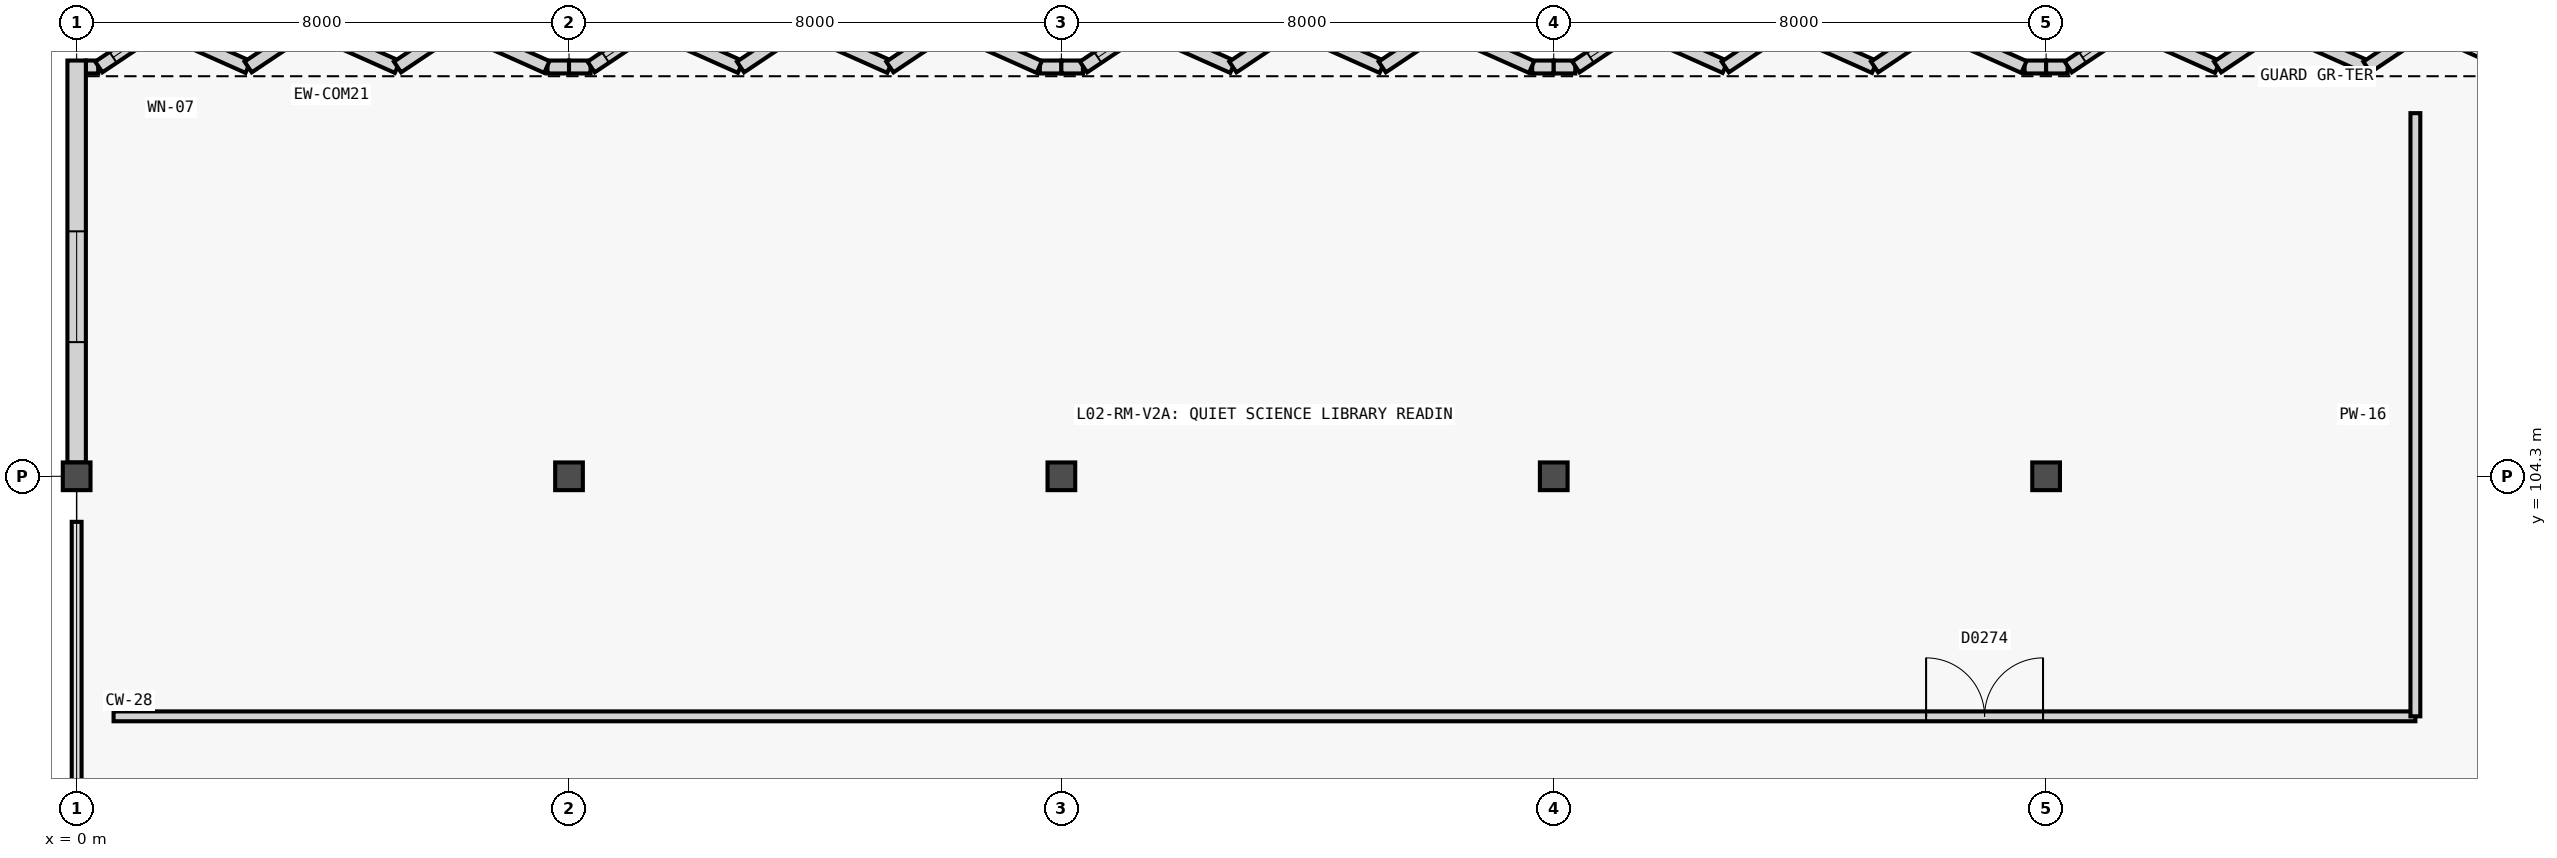
"""IFC4 building model, lengths in metres.
Left out: names, types, materials, properties, quantities, classifications, styles, units other than length and angle.
Written with IfcOpenShell. Run it as: python <this file> out.ifc"""

import sys

from ifc_helpers import new_model, si_unit, direction, frame, frame_2d, origin, origin_2d, place, context, subcontext, project, spatial, rectangle, extrude, element, fill, save


model = new_model("IFC4")
c1 = context("Model", 3, precision=1e-05, world=origin(), true_north=direction((0.0, 1.0)))
c2 = subcontext(c1, "Body", "Model", "MODEL_VIEW")
j1 = project(units=[si_unit("LENGTHUNIT", "METRE"), si_unit("PLANEANGLEUNIT", "RADIAN")], contexts=[c1])
p1 = place(None, origin())
s1 = spatial("IfcSite", under=j1, at=p1, CompositionType="ELEMENT")
p2 = place(p1, origin())
s2 = spatial("IfcBuilding", under=s1, at=p2, CompositionType="ELEMENT")
p3 = place(p2, frame((0.0, 0.0, 10.2)))
s3 = spatial("IfcBuildingStorey", under=s2, at=p3, CompositionType="ELEMENT", Elevation=10.2)
for number, where, z_axis, x_axis in (
    (1, (0.0, 104.3, 0.0), (0.0, 0.0, 1.0), (1.0, 0.0, 0.0)),
    (2, (8.0, 104.3, 0.0), (0.0, 0.0, 1.0), (1.0, 0.0, 0.0)),
    (3, (16.0, 104.3, 0.0), (0.0, 0.0, 1.0), (1.0, 0.0, 0.0)),
    (4, (24.0, 104.3, 0.0), (0.0, 0.0, 1.0), (1.0, 0.0, 0.0)),
    (5, (32.0, 104.3, 0.0), (0.0, 0.0, 1.0), (1.0, 0.0, 0.0)),
):
    element("IfcColumn", number, at=place(p3, frame(where, z_axis=z_axis, x_axis=x_axis)), inside=s3, PredefinedType="COLUMN", context=c2, shape_type="SweptSolid", body=[
        extrude(rectangle(XDim=0.45, YDim=0.45, at=origin_2d()), origin(), (0.0, 0.0, 1.0), 4.2),
    ])
p4 = place(p3, frame((0.145, 110.95, 0.0), z_axis=(0.0, 0.0, 1.0), x_axis=(1.0, 0.0, 0.0)))
e6 = element("IfcWall", 6, at=p4, inside=s3, PredefinedType="SOLIDWALL", context=c2, shape_type="SweptSolid", body=[
    extrude(rectangle(XDim=0.205, YDim=0.21, at=frame_2d((0.103, 0.0))), origin(), (0.0, 0.0, 1.0), 3.92),
])
for number, where, z_axis, x_axis in (
    (7, (7.65, 110.95, 0.0), (0.0, 0.0, 1.0), (1.0, 0.0, 0.0)),
    (8, (8.0, 110.95, 0.0), (0.0, 0.0, 1.0), (1.0, 0.0, 0.0)),
    (9, (15.65, 110.95, 0.0), (0.0, 0.0, 1.0), (1.0, 0.0, 0.0)),
    (10, (16.0, 110.95, 0.0), (0.0, 0.0, 1.0), (1.0, 0.0, 0.0)),
    (11, (23.65, 110.95, 0.0), (0.0, 0.0, 1.0), (1.0, 0.0, 0.0)),
    (12, (24.0, 110.95, 0.0), (0.0, 0.0, 1.0), (1.0, 0.0, 0.0)),
    (13, (31.65, 110.95, 0.0), (0.0, 0.0, 1.0), (1.0, 0.0, 0.0)),
    (14, (32.0, 110.95, 0.0), (0.0, 0.0, 1.0), (1.0, 0.0, 0.0)),
):
    element("IfcWall", number, at=place(p3, frame(where, z_axis=z_axis, x_axis=x_axis)), inside=s3, PredefinedType="SOLIDWALL", context=c2, shape_type="SweptSolid", body=[
        extrude(rectangle(XDim=0.35, YDim=0.21, at=frame_2d((0.175, 0.0))), origin(), (0.0, 0.0, 1.0), 3.92),
    ])
p5 = place(p3, frame((0.36, 110.95, 0.0), z_axis=(0.0, 0.0, 1.0), x_axis=(0.830858868059, 0.556483190553, 0.0)))
e15 = element("IfcWall", 15, at=p5, inside=s3, PredefinedType="SOLIDWALL", context=c2, shape_type="SweptSolid", body=[
    extrude(rectangle(XDim=1.168, YDim=0.21, at=frame_2d((0.584, 0.0))), origin(), (0.0, 0.0, 1.0), 3.92),
])
p6 = place(p5, frame((0.28, 0.0, 0.85)))
e16 = element("IfcOpeningElement", 16, at=p6, cuts=e15, PredefinedType="OPENING", context=c2, shape_type="SweptSolid", body=[
    extrude(rectangle(XDim=0.65, YDim=1.7, at=frame_2d((0.325, 0.85))), frame((0.0, 0.115, 0.0), z_axis=(0.0, -1.0, 0.0), x_axis=(1.0, 0.0, 0.0)), (0.0, 0.0, 1.0), 0.23),
])
p7 = place(p3, frame((1.331, 111.6, 0.0), z_axis=(0.0, 0.0, 1.0), x_axis=(0.913083928543, -0.407771675618, 0.0)))
e17 = element("IfcWall", 17, at=p7, inside=s3, PredefinedType="SOLIDWALL", context=c2, shape_type="SweptSolid", body=[
    extrude(rectangle(XDim=1.594, YDim=0.21, at=frame_2d((0.797, 0.0))), origin(), (0.0, 0.0, 1.0), 3.92),
])
p8 = place(p3, frame((2.787, 110.95, 0.0), z_axis=(0.0, 0.0, 1.0), x_axis=(0.830858868059, 0.556483190553, 0.0)))
e18 = element("IfcWall", 18, at=p8, inside=s3, PredefinedType="SOLIDWALL", context=c2, shape_type="SweptSolid", body=[
    extrude(rectangle(XDim=1.168, YDim=0.21, at=frame_2d((0.584, 0.0))), origin(), (0.0, 0.0, 1.0), 3.92),
])
p9 = place(p3, frame((3.757, 111.6, 0.0), z_axis=(0.0, 0.0, 1.0), x_axis=(0.913109384471, -0.407714669826, 0.0)))
e19 = element("IfcWall", 19, at=p9, inside=s3, PredefinedType="SOLIDWALL", context=c2, shape_type="SweptSolid", body=[
    extrude(rectangle(XDim=1.595, YDim=0.21, at=frame_2d((0.797, 0.0))), origin(), (0.0, 0.0, 1.0), 3.92),
])
p10 = place(p3, frame((5.213, 110.95, 0.0), z_axis=(0.0, 0.0, 1.0), x_axis=(0.830858868059, 0.556483190553, 0.0)))
e20 = element("IfcWall", 20, at=p10, inside=s3, PredefinedType="SOLIDWALL", context=c2, shape_type="SweptSolid", body=[
    extrude(rectangle(XDim=1.168, YDim=0.21, at=frame_2d((0.584, 0.0))), origin(), (0.0, 0.0, 1.0), 3.92),
])
p11 = place(p3, frame((6.184, 111.6, 0.0), z_axis=(0.0, 0.0, 1.0), x_axis=(0.913083928543, -0.407771675618, 0.0)))
e21 = element("IfcWall", 21, at=p11, inside=s3, PredefinedType="SOLIDWALL", context=c2, shape_type="SweptSolid", body=[
    extrude(rectangle(XDim=1.594, YDim=0.21, at=frame_2d((0.797, 0.0))), origin(), (0.0, 0.0, 1.0), 3.92),
])
p12 = place(p3, frame((8.36, 110.95, 0.0), z_axis=(0.0, 0.0, 1.0), x_axis=(0.830858868059, 0.556483190553, 0.0)))
e22 = element("IfcWall", 22, at=p12, inside=s3, PredefinedType="SOLIDWALL", context=c2, shape_type="SweptSolid", body=[
    extrude(rectangle(XDim=1.168, YDim=0.21, at=frame_2d((0.584, 0.0))), origin(), (0.0, 0.0, 1.0), 3.92),
])
p13 = place(p12, frame((0.28, 0.0, 0.85)))
e23 = element("IfcOpeningElement", 23, at=p13, cuts=e22, PredefinedType="OPENING", context=c2, shape_type="SweptSolid", body=[
    extrude(rectangle(XDim=0.65, YDim=1.7, at=frame_2d((0.325, 0.85))), frame((0.0, 0.115, 0.0), z_axis=(0.0, -1.0, 0.0), x_axis=(1.0, 0.0, 0.0)), (0.0, 0.0, 1.0), 0.23),
])
p14 = place(p3, frame((9.331, 111.6, 0.0), z_axis=(0.0, 0.0, 1.0), x_axis=(0.913083928543, -0.407771675618, 0.0)))
e24 = element("IfcWall", 24, at=p14, inside=s3, PredefinedType="SOLIDWALL", context=c2, shape_type="SweptSolid", body=[
    extrude(rectangle(XDim=1.594, YDim=0.21, at=frame_2d((0.797, 0.0))), origin(), (0.0, 0.0, 1.0), 3.92),
])
p15 = place(p3, frame((10.787, 110.95, 0.0), z_axis=(0.0, 0.0, 1.0), x_axis=(0.830858868059, 0.556483190553, 0.0)))
e25 = element("IfcWall", 25, at=p15, inside=s3, PredefinedType="SOLIDWALL", context=c2, shape_type="SweptSolid", body=[
    extrude(rectangle(XDim=1.168, YDim=0.21, at=frame_2d((0.584, 0.0))), origin(), (0.0, 0.0, 1.0), 3.92),
])
p16 = place(p3, frame((11.757, 111.6, 0.0), z_axis=(0.0, 0.0, 1.0), x_axis=(0.913109384471, -0.407714669826, 0.0)))
e26 = element("IfcWall", 26, at=p16, inside=s3, PredefinedType="SOLIDWALL", context=c2, shape_type="SweptSolid", body=[
    extrude(rectangle(XDim=1.595, YDim=0.21, at=frame_2d((0.797, 0.0))), origin(), (0.0, 0.0, 1.0), 3.92),
])
p17 = place(p3, frame((13.213, 110.95, 0.0), z_axis=(0.0, 0.0, 1.0), x_axis=(0.830858868059, 0.556483190553, 0.0)))
e27 = element("IfcWall", 27, at=p17, inside=s3, PredefinedType="SOLIDWALL", context=c2, shape_type="SweptSolid", body=[
    extrude(rectangle(XDim=1.168, YDim=0.21, at=frame_2d((0.584, 0.0))), origin(), (0.0, 0.0, 1.0), 3.92),
])
p18 = place(p3, frame((14.184, 111.6, 0.0), z_axis=(0.0, 0.0, 1.0), x_axis=(0.913083928543, -0.407771675618, 0.0)))
e28 = element("IfcWall", 28, at=p18, inside=s3, PredefinedType="SOLIDWALL", context=c2, shape_type="SweptSolid", body=[
    extrude(rectangle(XDim=1.594, YDim=0.21, at=frame_2d((0.797, 0.0))), origin(), (0.0, 0.0, 1.0), 3.92),
])
p19 = place(p3, frame((16.36, 110.95, 0.0), z_axis=(0.0, 0.0, 1.0), x_axis=(0.830858868059, 0.556483190553, 0.0)))
e29 = element("IfcWall", 29, at=p19, inside=s3, PredefinedType="SOLIDWALL", context=c2, shape_type="SweptSolid", body=[
    extrude(rectangle(XDim=1.168, YDim=0.21, at=frame_2d((0.584, 0.0))), origin(), (0.0, 0.0, 1.0), 3.92),
])
p20 = place(p19, frame((0.28, 0.0, 0.85)))
e30 = element("IfcOpeningElement", 30, at=p20, cuts=e29, PredefinedType="OPENING", context=c2, shape_type="SweptSolid", body=[
    extrude(rectangle(XDim=0.65, YDim=1.7, at=frame_2d((0.325, 0.85))), frame((0.0, 0.115, 0.0), z_axis=(0.0, -1.0, 0.0), x_axis=(1.0, 0.0, 0.0)), (0.0, 0.0, 1.0), 0.23),
])
p21 = place(p3, frame((17.331, 111.6, 0.0), z_axis=(0.0, 0.0, 1.0), x_axis=(0.913083928543, -0.407771675618, 0.0)))
e31 = element("IfcWall", 31, at=p21, inside=s3, PredefinedType="SOLIDWALL", context=c2, shape_type="SweptSolid", body=[
    extrude(rectangle(XDim=1.594, YDim=0.21, at=frame_2d((0.797, 0.0))), origin(), (0.0, 0.0, 1.0), 3.92),
])
p22 = place(p3, frame((18.787, 110.95, 0.0), z_axis=(0.0, 0.0, 1.0), x_axis=(0.830858868059, 0.556483190553, 0.0)))
e32 = element("IfcWall", 32, at=p22, inside=s3, PredefinedType="SOLIDWALL", context=c2, shape_type="SweptSolid", body=[
    extrude(rectangle(XDim=1.168, YDim=0.21, at=frame_2d((0.584, 0.0))), origin(), (0.0, 0.0, 1.0), 3.92),
])
p23 = place(p3, frame((19.757, 111.6, 0.0), z_axis=(0.0, 0.0, 1.0), x_axis=(0.913109384471, -0.407714669826, 0.0)))
e33 = element("IfcWall", 33, at=p23, inside=s3, PredefinedType="SOLIDWALL", context=c2, shape_type="SweptSolid", body=[
    extrude(rectangle(XDim=1.595, YDim=0.21, at=frame_2d((0.797, 0.0))), origin(), (0.0, 0.0, 1.0), 3.92),
])
p24 = place(p3, frame((21.213, 110.95, 0.0), z_axis=(0.0, 0.0, 1.0), x_axis=(0.830858868059, 0.556483190553, 0.0)))
e34 = element("IfcWall", 34, at=p24, inside=s3, PredefinedType="SOLIDWALL", context=c2, shape_type="SweptSolid", body=[
    extrude(rectangle(XDim=1.168, YDim=0.21, at=frame_2d((0.584, 0.0))), origin(), (0.0, 0.0, 1.0), 3.92),
])
p25 = place(p3, frame((22.184, 111.6, 0.0), z_axis=(0.0, 0.0, 1.0), x_axis=(0.913083928543, -0.407771675618, 0.0)))
e35 = element("IfcWall", 35, at=p25, inside=s3, PredefinedType="SOLIDWALL", context=c2, shape_type="SweptSolid", body=[
    extrude(rectangle(XDim=1.594, YDim=0.21, at=frame_2d((0.797, 0.0))), origin(), (0.0, 0.0, 1.0), 3.92),
])
p26 = place(p3, frame((24.36, 110.95, 0.0), z_axis=(0.0, 0.0, 1.0), x_axis=(0.830858868059, 0.556483190553, 0.0)))
e36 = element("IfcWall", 36, at=p26, inside=s3, PredefinedType="SOLIDWALL", context=c2, shape_type="SweptSolid", body=[
    extrude(rectangle(XDim=1.168, YDim=0.21, at=frame_2d((0.584, 0.0))), origin(), (0.0, 0.0, 1.0), 3.92),
])
p27 = place(p26, frame((0.28, 0.0, 0.85)))
e37 = element("IfcOpeningElement", 37, at=p27, cuts=e36, PredefinedType="OPENING", context=c2, shape_type="SweptSolid", body=[
    extrude(rectangle(XDim=0.65, YDim=1.7, at=frame_2d((0.325, 0.85))), frame((0.0, 0.115, 0.0), z_axis=(0.0, -1.0, 0.0), x_axis=(1.0, 0.0, 0.0)), (0.0, 0.0, 1.0), 0.23),
])
p28 = place(p3, frame((25.331, 111.6, 0.0), z_axis=(0.0, 0.0, 1.0), x_axis=(0.913083928543, -0.407771675618, 0.0)))
e38 = element("IfcWall", 38, at=p28, inside=s3, PredefinedType="SOLIDWALL", context=c2, shape_type="SweptSolid", body=[
    extrude(rectangle(XDim=1.594, YDim=0.21, at=frame_2d((0.797, 0.0))), origin(), (0.0, 0.0, 1.0), 3.92),
])
p29 = place(p3, frame((26.787, 110.95, 0.0), z_axis=(0.0, 0.0, 1.0), x_axis=(0.830858868059, 0.556483190553, 0.0)))
e39 = element("IfcWall", 39, at=p29, inside=s3, PredefinedType="SOLIDWALL", context=c2, shape_type="SweptSolid", body=[
    extrude(rectangle(XDim=1.168, YDim=0.21, at=frame_2d((0.584, 0.0))), origin(), (0.0, 0.0, 1.0), 3.92),
])
p30 = place(p3, frame((27.757, 111.6, 0.0), z_axis=(0.0, 0.0, 1.0), x_axis=(0.913109384471, -0.407714669826, 0.0)))
e40 = element("IfcWall", 40, at=p30, inside=s3, PredefinedType="SOLIDWALL", context=c2, shape_type="SweptSolid", body=[
    extrude(rectangle(XDim=1.595, YDim=0.21, at=frame_2d((0.797, 0.0))), origin(), (0.0, 0.0, 1.0), 3.92),
])
p31 = place(p3, frame((29.213, 110.95, 0.0), z_axis=(0.0, 0.0, 1.0), x_axis=(0.830858868059, 0.556483190553, 0.0)))
e41 = element("IfcWall", 41, at=p31, inside=s3, PredefinedType="SOLIDWALL", context=c2, shape_type="SweptSolid", body=[
    extrude(rectangle(XDim=1.168, YDim=0.21, at=frame_2d((0.584, 0.0))), origin(), (0.0, 0.0, 1.0), 3.92),
])
p32 = place(p3, frame((30.184, 111.6, 0.0), z_axis=(0.0, 0.0, 1.0), x_axis=(0.913083928543, -0.407771675618, 0.0)))
e42 = element("IfcWall", 42, at=p32, inside=s3, PredefinedType="SOLIDWALL", context=c2, shape_type="SweptSolid", body=[
    extrude(rectangle(XDim=1.594, YDim=0.21, at=frame_2d((0.797, 0.0))), origin(), (0.0, 0.0, 1.0), 3.92),
])
p33 = place(p3, frame((32.36, 110.95, 0.0), z_axis=(0.0, 0.0, 1.0), x_axis=(0.830858868059, 0.556483190553, 0.0)))
e43 = element("IfcWall", 43, at=p33, inside=s3, PredefinedType="SOLIDWALL", context=c2, shape_type="SweptSolid", body=[
    extrude(rectangle(XDim=1.168, YDim=0.21, at=frame_2d((0.584, 0.0))), origin(), (0.0, 0.0, 1.0), 3.92),
])
p34 = place(p33, frame((0.28, 0.0, 0.85)))
e44 = element("IfcOpeningElement", 44, at=p34, cuts=e43, PredefinedType="OPENING", context=c2, shape_type="SweptSolid", body=[
    extrude(rectangle(XDim=0.65, YDim=1.7, at=frame_2d((0.325, 0.85))), frame((0.0, 0.115, 0.0), z_axis=(0.0, -1.0, 0.0), x_axis=(1.0, 0.0, 0.0)), (0.0, 0.0, 1.0), 0.23),
])
p35 = place(p3, frame((33.331, 111.6, 0.0), z_axis=(0.0, 0.0, 1.0), x_axis=(0.913083928543, -0.407771675618, 0.0)))
e45 = element("IfcWall", 45, at=p35, inside=s3, PredefinedType="SOLIDWALL", context=c2, shape_type="SweptSolid", body=[
    extrude(rectangle(XDim=1.594, YDim=0.21, at=frame_2d((0.797, 0.0))), origin(), (0.0, 0.0, 1.0), 3.92),
])
p36 = place(p3, frame((34.787, 110.95, 0.0), z_axis=(0.0, 0.0, 1.0), x_axis=(0.830858868059, 0.556483190553, 0.0)))
e46 = element("IfcWall", 46, at=p36, inside=s3, PredefinedType="SOLIDWALL", context=c2, shape_type="SweptSolid", body=[
    extrude(rectangle(XDim=1.168, YDim=0.21, at=frame_2d((0.584, 0.0))), origin(), (0.0, 0.0, 1.0), 3.92),
])
p37 = place(p3, frame((35.757, 111.6, 0.0), z_axis=(0.0, 0.0, 1.0), x_axis=(0.913109384471, -0.407714669826, 0.0)))
e47 = element("IfcWall", 47, at=p37, inside=s3, PredefinedType="SOLIDWALL", context=c2, shape_type="SweptSolid", body=[
    extrude(rectangle(XDim=1.595, YDim=0.21, at=frame_2d((0.797, 0.0))), origin(), (0.0, 0.0, 1.0), 3.92),
])
p38 = place(p3, frame((37.213, 110.95, 0.0), z_axis=(0.0, 0.0, 1.0), x_axis=(0.830858868059, 0.556483190553, 0.0)))
e48 = element("IfcWall", 48, at=p38, inside=s3, PredefinedType="SOLIDWALL", context=c2, shape_type="SweptSolid", body=[
    extrude(rectangle(XDim=1.168, YDim=0.21, at=frame_2d((0.584, 0.0))), origin(), (0.0, 0.0, 1.0), 3.92),
])
p39 = place(p3, frame((38.184, 111.6, 0.0), z_axis=(0.0, 0.0, 1.0), x_axis=(0.913083928543, -0.407771675618, 0.0)))
e49 = element("IfcWall", 49, at=p39, inside=s3, PredefinedType="SOLIDWALL", context=c2, shape_type="SweptSolid", body=[
    extrude(rectangle(XDim=1.594, YDim=0.21, at=frame_2d((0.797, 0.0))), origin(), (0.0, 0.0, 1.0), 3.92),
])
p40 = place(p3, frame((0.0, 104.523, 0.0), z_axis=(0.0, 0.0, 1.0), x_axis=(0.0, 1.0, 0.0)))
e50 = element("IfcWall", 50, at=p40, inside=s3, PredefinedType="SOLIDWALL", context=c2, shape_type="SweptSolid", body=[
    extrude(rectangle(XDim=6.532, YDim=0.3, at=frame_2d((3.266, 0.0))), origin(), (0.0, 0.0, 1.0), 3.92),
])
p41 = place(p40, frame((1.957, 0.0, 0.9)))
e51 = element("IfcOpeningElement", 51, at=p41, cuts=e50, PredefinedType="OPENING", context=c2, shape_type="SweptSolid", body=[
    extrude(rectangle(XDim=1.8, YDim=1.55, at=frame_2d((0.9, 0.775))), frame((0.0, 0.16, 0.0), z_axis=(0.0, -1.0, 0.0), x_axis=(1.0, 0.0, 0.0)), (0.0, 0.0, 1.0), 0.32),
])
p42 = place(p3, frame((0.6, 100.4, 0.0), z_axis=(0.0, 0.0, 1.0), x_axis=(1.0, 0.0, 0.0)))
e52 = element("IfcWall", 52, at=p42, inside=s3, PredefinedType="PARTITIONING", context=c2, shape_type="SweptSolid", body=[
    extrude(rectangle(XDim=37.4, YDim=0.16, at=frame_2d((18.7, 0.0))), origin(), (0.0, 0.0, 1.0), 3.94),
])
p43 = place(p42, frame((29.45, 0.0, 0.0)))
e53 = element("IfcOpeningElement", 53, at=p43, cuts=e52, PredefinedType="OPENING", context=c2, shape_type="SweptSolid", body=[
    extrude(rectangle(XDim=1.9, YDim=2.3, at=frame_2d((0.95, 1.15))), frame((0.0, 0.09, 0.0), z_axis=(0.0, -1.0, 0.0), x_axis=(1.0, 0.0, 0.0)), (0.0, 0.0, 1.0), 0.18),
])
p44 = place(p3, frame((38.0, 100.4, 0.0), z_axis=(0.0, 0.0, 1.0), x_axis=(0.0, 1.0, 0.0)))
e54 = element("IfcWall", 54, at=p44, inside=s3, PredefinedType="PARTITIONING", context=c2, shape_type="SweptSolid", body=[
    extrude(rectangle(XDim=9.8, YDim=0.16, at=frame_2d((4.9, 0.0))), origin(), (0.0, 0.0, 1.0), 3.94),
])
p45 = place(p6, origin())
e55 = element("IfcWindow", 55, at=p45, inside=s3, PartitioningType="SINGLE_PANEL", PredefinedType="WINDOW", context=c2, shape_type="SweptSolid", body=[
    extrude(rectangle(XDim=0.65, YDim=1.7, at=frame_2d((0.325, 0.85))), frame((0.0, 0.03, 0.0), z_axis=(0.0, -1.0, 0.0), x_axis=(1.0, 0.0, 0.0)), (0.0, 0.0, 1.0), 0.06),
])
fill(e16, e55)
p46 = place(p13, origin())
e56 = element("IfcWindow", 56, at=p46, inside=s3, PartitioningType="SINGLE_PANEL", PredefinedType="WINDOW", context=c2, shape_type="SweptSolid", body=[
    extrude(rectangle(XDim=0.65, YDim=1.7, at=frame_2d((0.325, 0.85))), frame((0.0, 0.03, 0.0), z_axis=(0.0, -1.0, 0.0), x_axis=(1.0, 0.0, 0.0)), (0.0, 0.0, 1.0), 0.06),
])
fill(e23, e56)
p47 = place(p20, origin())
e57 = element("IfcWindow", 57, at=p47, inside=s3, PartitioningType="SINGLE_PANEL", PredefinedType="WINDOW", context=c2, shape_type="SweptSolid", body=[
    extrude(rectangle(XDim=0.65, YDim=1.7, at=frame_2d((0.325, 0.85))), frame((0.0, 0.03, 0.0), z_axis=(0.0, -1.0, 0.0), x_axis=(1.0, 0.0, 0.0)), (0.0, 0.0, 1.0), 0.06),
])
fill(e30, e57)
p48 = place(p27, origin())
e58 = element("IfcWindow", 58, at=p48, inside=s3, PartitioningType="SINGLE_PANEL", PredefinedType="WINDOW", context=c2, shape_type="SweptSolid", body=[
    extrude(rectangle(XDim=0.65, YDim=1.7, at=frame_2d((0.325, 0.85))), frame((0.0, 0.03, 0.0), z_axis=(0.0, -1.0, 0.0), x_axis=(1.0, 0.0, 0.0)), (0.0, 0.0, 1.0), 0.06),
])
fill(e37, e58)
p49 = place(p34, origin())
e59 = element("IfcWindow", 59, at=p49, inside=s3, PartitioningType="SINGLE_PANEL", PredefinedType="WINDOW", context=c2, shape_type="SweptSolid", body=[
    extrude(rectangle(XDim=0.65, YDim=1.7, at=frame_2d((0.325, 0.85))), frame((0.0, 0.03, 0.0), z_axis=(0.0, -1.0, 0.0), x_axis=(1.0, 0.0, 0.0)), (0.0, 0.0, 1.0), 0.06),
])
fill(e44, e59)
p50 = place(p41, origin())
e60 = element("IfcWindow", 60, at=p50, inside=s3, PartitioningType="SINGLE_PANEL", PredefinedType="WINDOW", context=c2, shape_type="SweptSolid", body=[
    extrude(rectangle(XDim=1.8, YDim=1.55, at=frame_2d((0.9, 0.775))), frame((0.0, 0.03, 0.0), z_axis=(0.0, -1.0, 0.0), x_axis=(1.0, 0.0, 0.0)), (0.0, 0.0, 1.0), 0.06),
])
fill(e51, e60)
p51 = place(p43, origin())
e61 = element("IfcDoor", 61, at=p51, inside=s3, OperationType="DOUBLE_DOOR_SINGLE_SWING", PredefinedType="DOOR", context=c2, shape_type="SweptSolid", body=[
    extrude(rectangle(XDim=1.9, YDim=2.3, at=frame_2d((0.95, 1.15))), frame((0.0, 0.025, 0.0), z_axis=(0.0, -1.0, 0.0), x_axis=(1.0, 0.0, 0.0)), (0.0, 0.0, 1.0), 0.05),
])
fill(e53, e61)
save(model, sys.argv[1])
